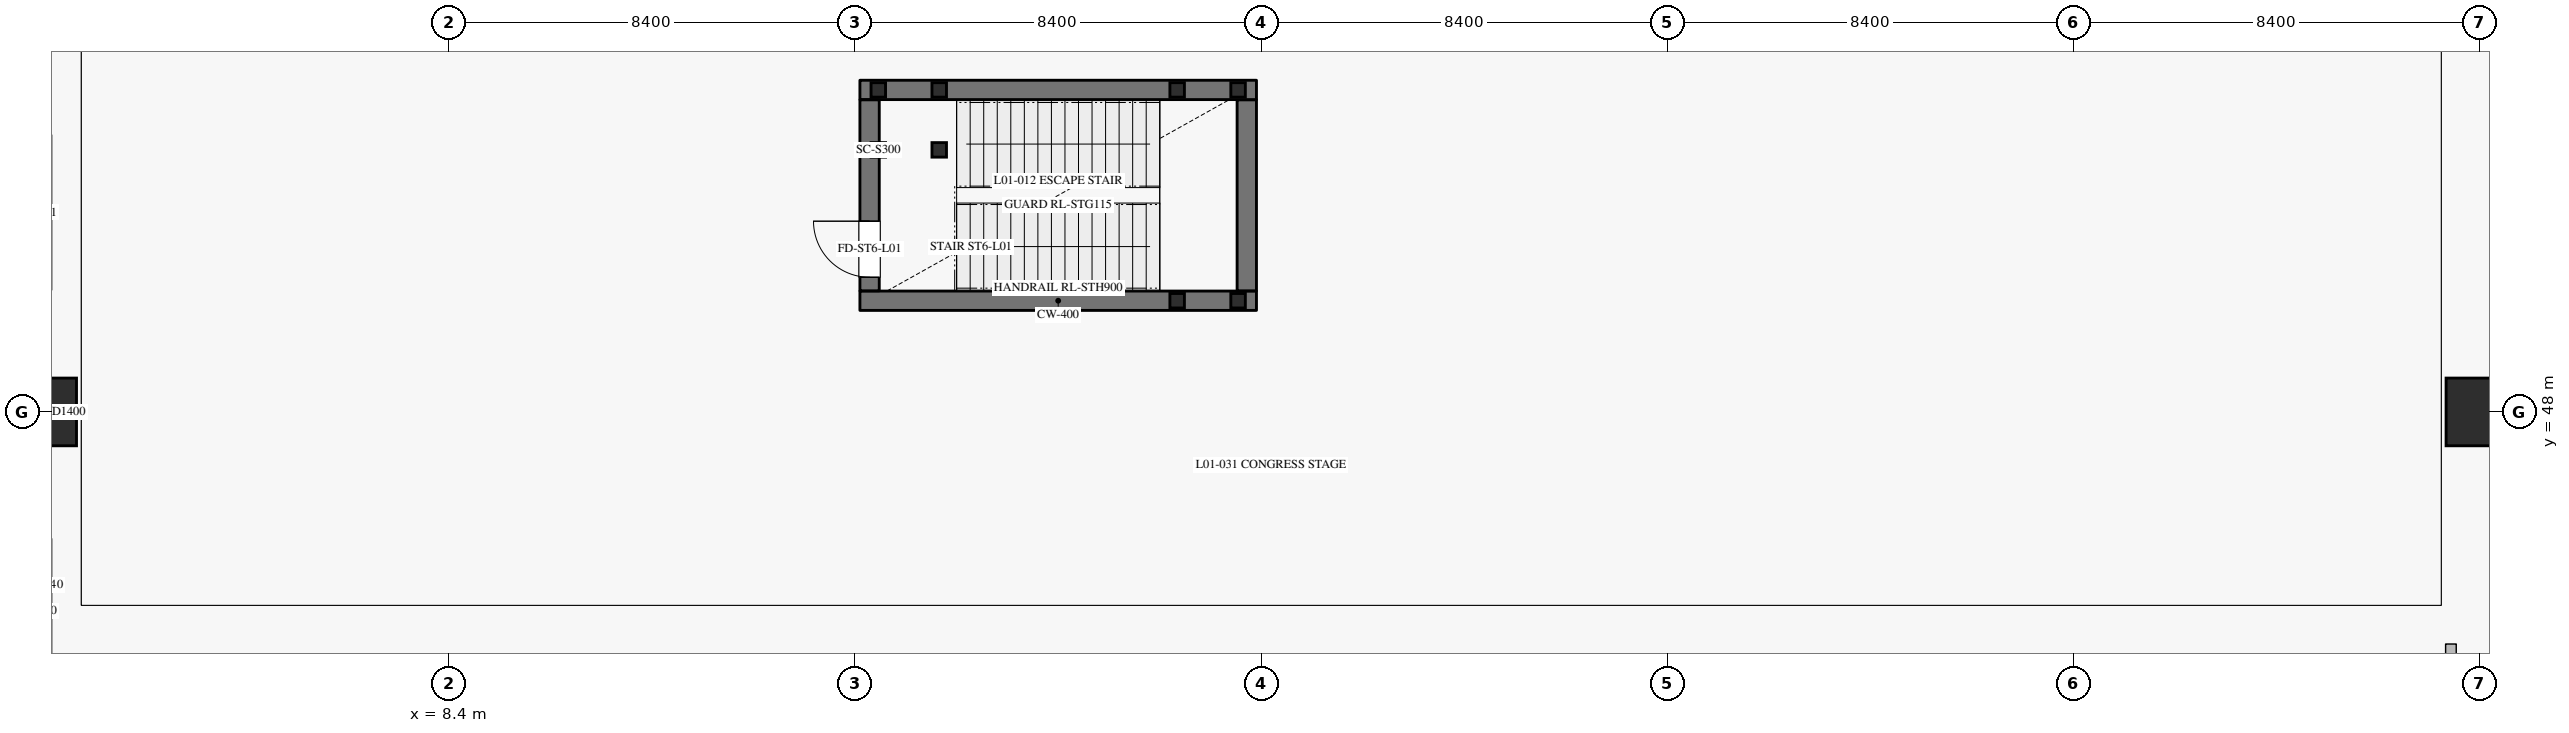
"""IFC4 building model, lengths in metres.
Left out: names, types, materials, properties, quantities, classifications, styles, units other than length and angle.
Written with IfcOpenShell. Run it as: python <this file> out.ifc"""

import sys

from ifc_helpers import new_model, si_unit, direction, frame, frame_2d, origin, origin_2d, place, context, subcontext, project, spatial, rectangle, hollow_rectangle, circle, extrude, element, fill, save


model = new_model("IFC4")
c1 = context("Model", 3, precision=1e-05, world=origin(), true_north=direction((0.0, 1.0)))
c2 = subcontext(c1, "Body", "Model", "MODEL_VIEW")
j1 = project(units=[si_unit("LENGTHUNIT", "METRE"), si_unit("PLANEANGLEUNIT", "RADIAN")], contexts=[c1])
p1 = place(None, origin())
s1 = spatial("IfcSite", under=j1, at=p1, CompositionType="ELEMENT")
p2 = place(p1, origin())
s2 = spatial("IfcBuilding", under=s1, at=p2, CompositionType="ELEMENT")
p3 = place(p2, frame((0.0, 0.0, 6.0)))
s3 = spatial("IfcBuildingStorey", under=s2, at=p3, CompositionType="ELEMENT", Elevation=6.0)
for number, where, z_axis, x_axis in (
    (1, (0.0, 48.0, 0.0), (0.0, 0.0, 1.0), (1.0, 0.0, 0.0)),
    (2, (50.4, 48.0, 0.0), (0.0, 0.0, 1.0), (1.0, 0.0, 0.0)),
):
    element("IfcColumn", number, at=place(p3, frame(where, z_axis=z_axis, x_axis=x_axis)), inside=s3, PredefinedType="COLUMN", context=c2, shape_type="SweptSolid", body=[
        extrude(circle(Radius=0.7, at=origin_2d()), origin(), (0.0, 0.0, 1.0), 5.4),
    ])
p4 = place(p3, frame((16.9, 50.3, 0.0), z_axis=(0.0, 0.0, 1.0), x_axis=(1.0, 0.0, 0.0)))
e3 = element("IfcWall", 3, at=p4, inside=s3, PredefinedType="SHEAR", context=c2, shape_type="SweptSolid", body=[
    extrude(rectangle(XDim=8.2, YDim=0.4, at=frame_2d((4.1, 0.0))), origin(), (0.0, 0.0, 1.0), 5.045),
])
p5 = place(p3, frame((24.9, 50.505, 0.0), z_axis=(0.0, 0.0, 1.0), x_axis=(0.0, 1.0, 0.0)))
e4 = element("IfcWall", 4, at=p5, inside=s3, PredefinedType="SHEAR", context=c2, shape_type="SweptSolid", body=[
    extrude(rectangle(XDim=3.95, YDim=0.4, at=frame_2d((1.975, 0.0))), origin(), (0.0, 0.0, 1.0), 5.045),
])
p6 = place(p3, frame((16.9, 54.66, 0.0), z_axis=(0.0, 0.0, 1.0), x_axis=(1.0, 0.0, 0.0)))
e5 = element("IfcWall", 5, at=p6, inside=s3, PredefinedType="SHEAR", context=c2, shape_type="SweptSolid", body=[
    extrude(rectangle(XDim=8.2, YDim=0.4, at=frame_2d((4.1, 0.0))), origin(), (0.0, 0.0, 1.0), 5.045),
])
p7 = place(p3, frame((17.1, 50.505, 0.0), z_axis=(0.0, 0.0, 1.0), x_axis=(0.0, 1.0, 0.0)))
e6 = element("IfcWall", 6, at=p7, inside=s3, PredefinedType="SHEAR", context=c2, shape_type="SweptSolid", body=[
    extrude(rectangle(XDim=3.95, YDim=0.4, at=frame_2d((1.975, 0.0))), origin(), (0.0, 0.0, 1.0), 5.045),
])
p8 = place(p7, frame((0.28, 0.0, 0.0)))
e7 = element("IfcOpeningElement", 7, at=p8, cuts=e6, PredefinedType="OPENING", context=c2, shape_type="SweptSolid", body=[
    extrude(rectangle(XDim=1.16, YDim=2.2, at=frame_2d((0.58, 1.1))), frame((0.0, 0.21, 0.0), z_axis=(0.0, -1.0, 0.0), x_axis=(1.0, 0.0, 0.0)), (0.0, 0.0, 1.0), 0.42),
])
for number, where, z_axis, x_axis in (
    (8, (17.28, 53.42, 0.0), (0.0, 0.0, 1.0), (1.0, 0.0, 0.0)),
    (9, (17.28, 54.66, 0.0), (0.0, 0.0, 1.0), (1.0, 0.0, 0.0)),
    (10, (18.54, 53.42, 0.0), (0.0, 0.0, 1.0), (1.0, 0.0, 0.0)),
    (11, (18.54, 54.66, 0.0), (0.0, 0.0, 1.0), (1.0, 0.0, 0.0)),
):
    element("IfcColumn", number, at=place(p3, frame(where, z_axis=z_axis, x_axis=x_axis)), inside=s3, PredefinedType="COLUMN", context=c2, shape_type="SweptSolid", body=[
        extrude(hollow_rectangle(XDim=0.3, YDim=0.3, WallThickness=0.012, at=origin_2d()), origin(), (0.0, 0.0, 1.0), 5.22),
    ])
for number, where, z_axis, x_axis in (
    (12, (23.46, 50.3, -3.0), (0.0, 0.0, 1.0), (1.0, 0.0, 0.0)),
    (13, (23.46, 54.66, -3.0), (0.0, 0.0, 1.0), (1.0, 0.0, 0.0)),
    (14, (24.72, 50.3, -3.0), (0.0, 0.0, 1.0), (1.0, 0.0, 0.0)),
    (15, (24.72, 54.66, -3.0), (0.0, 0.0, 1.0), (1.0, 0.0, 0.0)),
):
    element("IfcColumn", number, at=place(p3, frame(where, z_axis=z_axis, x_axis=x_axis)), inside=s3, PredefinedType="COLUMN", context=c2, shape_type="SweptSolid", body=[
        extrude(hollow_rectangle(XDim=0.3, YDim=0.3, WallThickness=0.012, at=origin_2d()), origin(), (0.0, 0.0, 1.0), 5.52),
    ])
p9 = place(p3, frame((49.8, 9.2, 0.0), z_axis=(0.0, 0.0, 1.0), x_axis=(0.0, 1.0, 0.0)))
e16 = element("IfcWall", 16, at=p9, inside=s3, PredefinedType="PARTITIONING", context=c2, shape_type="SweptSolid", body=[
    extrude(rectangle(XDim=34.0, YDim=0.22, at=frame_2d((17.0, 0.0))), origin(), (0.0, 0.0, 1.0), 5.045),
])
p10 = place(p9, frame((1.75, 0.0, 0.0)))
e17 = element("IfcOpeningElement", 17, at=p10, cuts=e16, PredefinedType="OPENING", context=c2, shape_type="SweptSolid", body=[
    extrude(rectangle(XDim=2.1, YDim=2.5, at=frame_2d((1.05, 1.25))), frame((0.0, 0.12, 0.0), z_axis=(0.0, -1.0, 0.0), x_axis=(1.0, 0.0, 0.0)), (0.0, 0.0, 1.0), 0.24),
])
p11 = place(p9, frame((15.8, 0.0, 0.0)))
e18 = element("IfcOpeningElement", 18, at=p11, cuts=e16, PredefinedType="OPENING", context=c2, shape_type="SweptSolid", body=[
    extrude(rectangle(XDim=2.1, YDim=2.5, at=frame_2d((1.05, 1.25))), frame((0.0, 0.12, 0.0), z_axis=(0.0, -1.0, 0.0), x_axis=(1.0, 0.0, 0.0)), (0.0, 0.0, 1.0), 0.24),
])
p12 = place(p9, frame((27.6, 0.0, 0.0)))
e19 = element("IfcOpeningElement", 19, at=p12, cuts=e16, PredefinedType="OPENING", context=c2, shape_type="SweptSolid", body=[
    extrude(rectangle(XDim=2.1, YDim=2.5, at=frame_2d((1.05, 1.25))), frame((0.0, 0.12, 0.0), z_axis=(0.0, -1.0, 0.0), x_axis=(1.0, 0.0, 0.0)), (0.0, 0.0, 1.0), 0.24),
])
p13 = place(p8, origin())
e20 = element("IfcDoor", 20, at=p13, inside=s3, OperationType="SINGLE_SWING_RIGHT", PredefinedType="DOOR", context=c2, shape_type="SweptSolid", body=[
    extrude(rectangle(XDim=1.16, YDim=2.2, at=frame_2d((0.58, 1.1))), frame((0.0, 0.025, 0.0), z_axis=(0.0, -1.0, 0.0), x_axis=(1.0, 0.0, 0.0)), (0.0, 0.0, 1.0), 0.05),
])
fill(e7, e20)
save(model, sys.argv[1])
